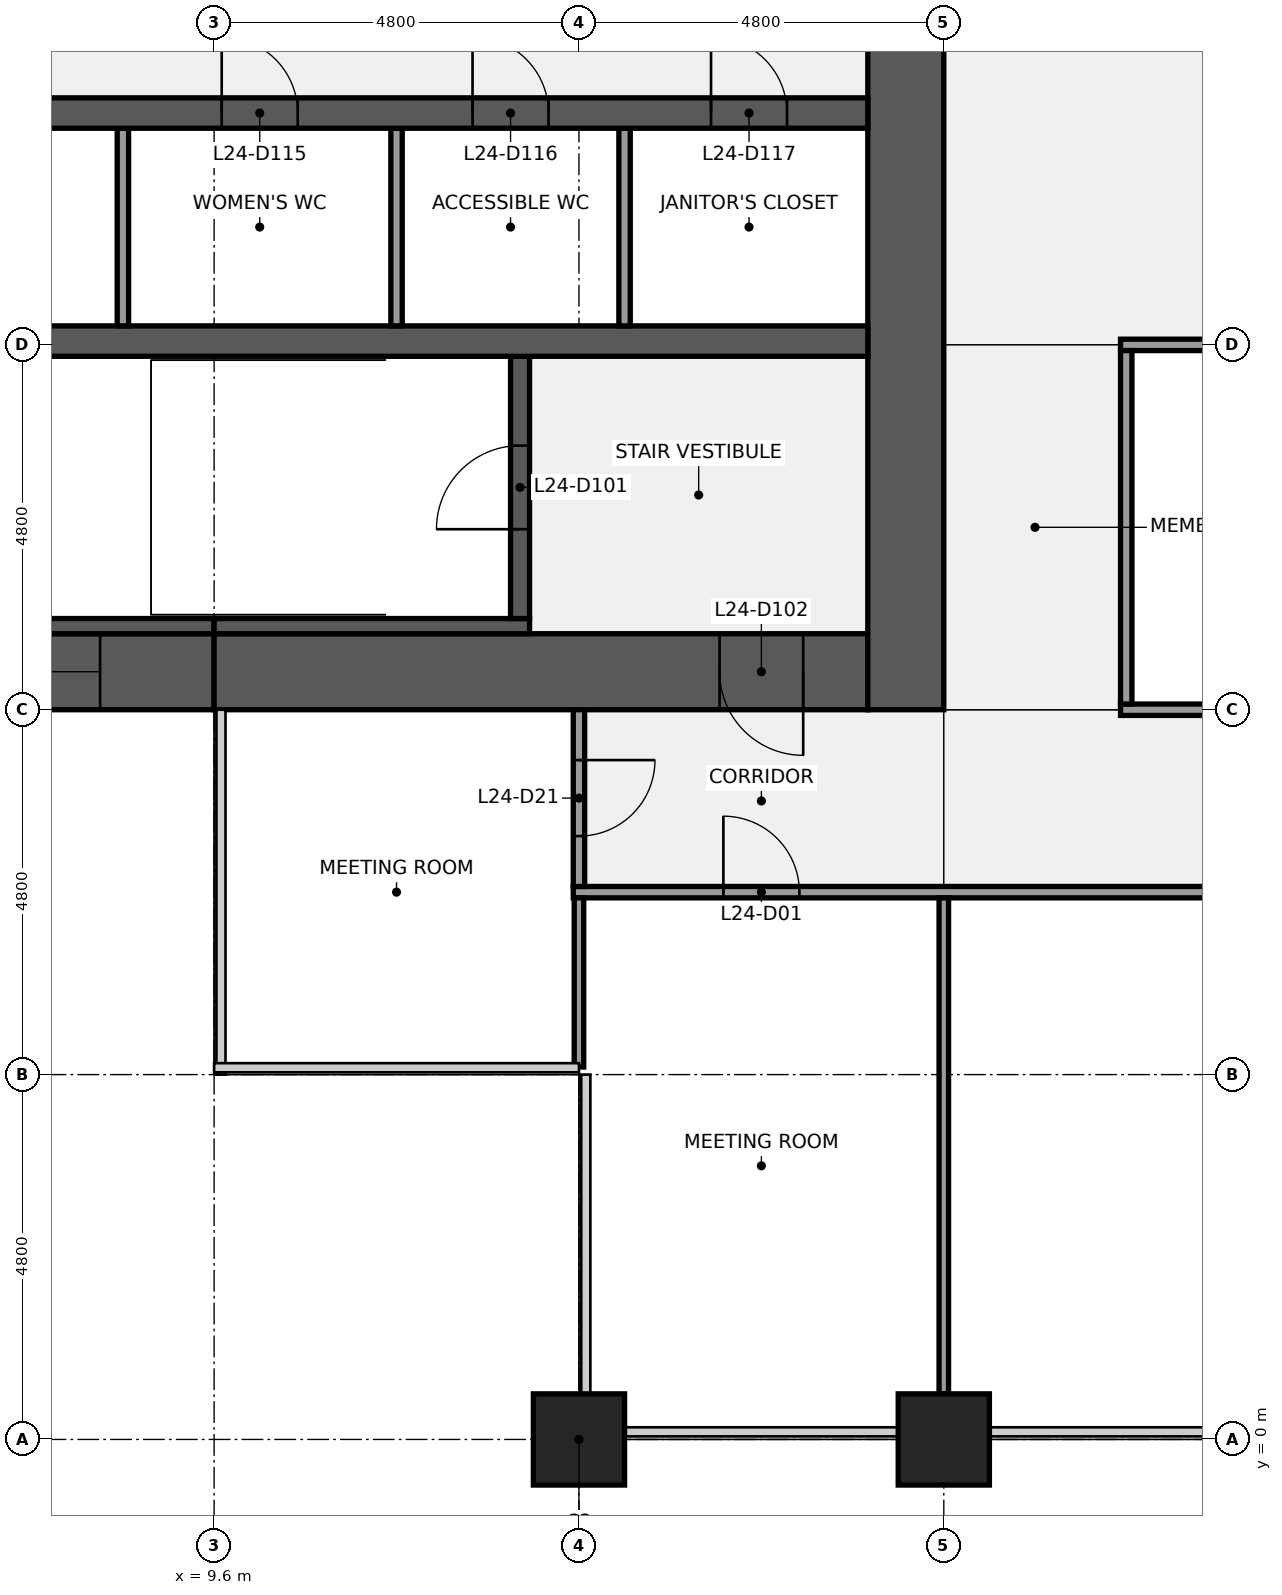
"""IFC4 building model, lengths in metres.
Left out: names, types, materials, properties, quantities, classifications, styles, units other than length and angle.
Written with IfcOpenShell. Run it as: python <this file> out.ifc"""

import sys

from ifc_helpers import new_model, si_unit, direction, frame, frame_2d, origin, origin_2d, place, context, subcontext, project, spatial, rectangle, extrude, element, fill, save


model = new_model("IFC4")
c1 = context("Model", 3, precision=1e-05, world=origin(), true_north=direction((0.0, 1.0)))
c2 = subcontext(c1, "Body", "Model", "MODEL_VIEW")
j1 = project(units=[si_unit("LENGTHUNIT", "METRE"), si_unit("PLANEANGLEUNIT", "RADIAN")], contexts=[c1])
p1 = place(None, origin())
s1 = spatial("IfcSite", under=j1, at=p1, CompositionType="ELEMENT")
p2 = place(p1, origin())
s2 = spatial("IfcBuilding", under=s1, at=p2, CompositionType="ELEMENT")
p3 = place(p2, frame((0.0, 0.0, 116.1)))
s3 = spatial("IfcBuildingStorey", under=s2, at=p3, CompositionType="ELEMENT", Elevation=116.1)
for number, where, z_axis, x_axis in (
    (1, (14.4, 0.0, 0.0), (0.0, 0.0, 1.0), (1.0, 0.0, 0.0)),
    (2, (19.2, 0.0, 0.0), (0.0, 0.0, 1.0), (1.0, 0.0, 0.0)),
):
    element("IfcColumn", number, at=place(p3, frame(where, z_axis=z_axis, x_axis=x_axis)), inside=s3, PredefinedType="COLUMN", context=c2, shape_type="SweptSolid", body=[
        extrude(rectangle(XDim=1.2, YDim=1.2, at=origin_2d()), origin(), (0.0, 0.0, 1.0), 4.0),
    ])
p4 = place(p3, frame((9.6, 10.1, 0.0), z_axis=(0.0, 0.0, 1.0), x_axis=(-1.0, 0.0, 0.0)))
e3 = element("IfcWall", 3, at=p4, inside=s3, PredefinedType="SHEAR", context=c2, shape_type="SweptSolid", body=[
    extrude(rectangle(XDim=8.6, YDim=1.0, at=frame_2d((4.3, 0.0))), origin(), (0.0, 0.0, 1.0), 3.84),
])
p5 = place(p4, frame((1.5, 0.0, 0.9)))
e4 = element("IfcOpeningElement", 4, at=p5, cuts=e3, PredefinedType="OPENING", context=c2, shape_type="SweptSolid", body=[
    extrude(rectangle(XDim=1.8, YDim=1.5, at=frame_2d((0.9, 0.75))), frame((0.0, 0.51, 0.0), z_axis=(0.0, -1.0, 0.0), x_axis=(1.0, 0.0, 0.0)), (0.0, 0.0, 1.0), 1.02),
])
p6 = place(p3, frame((18.2, 10.1, 0.0), z_axis=(0.0, 0.0, 1.0), x_axis=(-1.0, 0.0, 0.0)))
e5 = element("IfcWall", 5, at=p6, inside=s3, PredefinedType="SHEAR", context=c2, shape_type="SweptSolid", body=[
    extrude(rectangle(XDim=8.6, YDim=1.0, at=frame_2d((4.3, 0.0))), origin(), (0.0, 0.0, 1.0), 3.84),
])
p7 = place(p6, frame((0.85, 0.0, 0.0)))
e6 = element("IfcOpeningElement", 6, at=p7, cuts=e5, PredefinedType="OPENING", context=c2, shape_type="SweptSolid", body=[
    extrude(rectangle(XDim=1.1, YDim=2.1, at=frame_2d((0.55, 1.05))), frame((0.0, 0.51, 0.0), z_axis=(0.0, -1.0, 0.0), x_axis=(1.0, 0.0, 0.0)), (0.0, 0.0, 1.0), 1.02),
])
p8 = place(p3, frame((18.7, 38.4, 0.0), z_axis=(0.0, 0.0, 1.0), x_axis=(0.0, -1.0, 0.0)))
e7 = element("IfcWall", 7, at=p8, inside=s3, PredefinedType="SHEAR", context=c2, shape_type="SweptSolid", body=[
    extrude(rectangle(XDim=28.8, YDim=1.0, at=frame_2d((14.4, 0.0))), origin(), (0.0, 0.0, 1.0), 3.84),
])
p9 = place(p8, frame((18.3, 0.0, 0.0)))
e8 = element("IfcOpeningElement", 8, at=p9, cuts=e7, PredefinedType="OPENING", context=c2, shape_type="SweptSolid", body=[
    extrude(rectangle(XDim=1.8, YDim=2.1, at=frame_2d((0.9, 1.05))), frame((0.0, 0.51, 0.0), z_axis=(0.0, -1.0, 0.0), x_axis=(1.0, 0.0, 0.0)), (0.0, 0.0, 1.0), 1.02),
])
p10 = place(p8, frame((8.7, 0.0, 0.0)))
e9 = element("IfcOpeningElement", 9, at=p10, cuts=e7, PredefinedType="OPENING", context=c2, shape_type="SweptSolid", body=[
    extrude(rectangle(XDim=1.8, YDim=2.1, at=frame_2d((0.9, 1.05))), frame((0.0, 0.51, 0.0), z_axis=(0.0, -1.0, 0.0), x_axis=(1.0, 0.0, 0.0)), (0.0, 0.0, 1.0), 1.02),
])
p11 = place(p3, frame((6.25, 10.7, 0.0), z_axis=(0.0, 0.0, 1.0), x_axis=(1.0, 0.0, 0.0)))
e10 = element("IfcWall", 10, at=p11, inside=s3, PredefinedType="SHEAR", context=c2, shape_type="SweptSolid", body=[
    extrude(rectangle(XDim=3.35, YDim=0.2, at=frame_2d((1.675, 0.0))), origin(), (0.0, 0.0, 1.0), 3.84),
])
p12 = place(p3, frame((9.6, 10.7, 0.0), z_axis=(0.0, 0.0, 1.0), x_axis=(1.0, 0.0, 0.0)))
e11 = element("IfcWall", 11, at=p12, inside=s3, PredefinedType="SHEAR", context=c2, shape_type="SweptSolid", body=[
    extrude(rectangle(XDim=4.15, YDim=0.2, at=frame_2d((2.075, 0.0))), origin(), (0.0, 0.0, 1.0), 3.84),
])
p13 = place(p3, frame((13.625, 10.8, 0.0), z_axis=(0.0, 0.0, 1.0), x_axis=(0.0, 1.0, 0.0)))
e12 = element("IfcWall", 12, at=p13, inside=s3, PredefinedType="SHEAR", context=c2, shape_type="SweptSolid", body=[
    extrude(rectangle(XDim=3.45, YDim=0.25, at=frame_2d((1.725, 0.0))), origin(), (0.0, 0.0, 1.0), 3.84),
])
p14 = place(p13, frame((1.175, 0.0, 0.0)))
e13 = element("IfcOpeningElement", 13, at=p14, cuts=e12, PredefinedType="OPENING", context=c2, shape_type="SweptSolid", body=[
    extrude(rectangle(XDim=1.1, YDim=2.1, at=frame_2d((0.55, 1.05))), frame((0.0, 0.135, 0.0), z_axis=(0.0, -1.0, 0.0), x_axis=(1.0, 0.0, 0.0)), (0.0, 0.0, 1.0), 0.27),
])
p15 = place(p3, frame((1.0, 14.45, 0.0), z_axis=(0.0, 0.0, 1.0), x_axis=(1.0, 0.0, 0.0)))
e14 = element("IfcWall", 14, at=p15, inside=s3, PredefinedType="SHEAR", context=c2, shape_type="SweptSolid", body=[
    extrude(rectangle(XDim=17.2, YDim=0.4, at=frame_2d((8.6, 0.0))), origin(), (0.0, 0.0, 1.0), 3.84),
])
for number, where, z_axis, x_axis in (
    (15, (8.4, 14.65, 0.0), (0.0, 0.0, 1.0), (0.0, 1.0, 0.0)),
    (16, (12.0, 14.65, 0.0), (0.0, 0.0, 1.0), (0.0, 1.0, 0.0)),
    (17, (15.0, 14.65, 0.0), (0.0, 0.0, 1.0), (0.0, 1.0, 0.0)),
):
    element("IfcWall", number, at=place(p3, frame(where, z_axis=z_axis, x_axis=x_axis)), inside=s3, PredefinedType="PARTITIONING", context=c2, shape_type="SweptSolid", body=[
        extrude(rectangle(XDim=2.6, YDim=0.15, at=frame_2d((1.3, 0.0))), origin(), (0.0, 0.0, 1.0), 3.84),
    ])
p16 = place(p3, frame((1.0, 17.45, 0.0), z_axis=(0.0, 0.0, 1.0), x_axis=(1.0, 0.0, 0.0)))
e18 = element("IfcWall", 18, at=p16, inside=s3, PredefinedType="SHEAR", context=c2, shape_type="SweptSolid", body=[
    extrude(rectangle(XDim=17.2, YDim=0.4, at=frame_2d((8.6, 0.0))), origin(), (0.0, 0.0, 1.0), 3.84),
])
p17 = place(p16, frame((3.163, 0.0, 0.0)))
e19 = element("IfcOpeningElement", 19, at=p17, cuts=e18, PredefinedType="OPENING", context=c2, shape_type="SweptSolid", body=[
    extrude(rectangle(XDim=1.0, YDim=2.1, at=frame_2d((0.5, 1.05))), frame((0.0, 0.21, 0.0), z_axis=(0.0, -1.0, 0.0), x_axis=(1.0, 0.0, 0.0)), (0.0, 0.0, 1.0), 0.42),
])
p18 = place(p16, frame((8.7, 0.0, 0.0)))
e20 = element("IfcOpeningElement", 20, at=p18, cuts=e18, PredefinedType="OPENING", context=c2, shape_type="SweptSolid", body=[
    extrude(rectangle(XDim=1.0, YDim=2.1, at=frame_2d((0.5, 1.05))), frame((0.0, 0.21, 0.0), z_axis=(0.0, -1.0, 0.0), x_axis=(1.0, 0.0, 0.0)), (0.0, 0.0, 1.0), 0.42),
])
p19 = place(p16, frame((12.0, 0.0, 0.0)))
e21 = element("IfcOpeningElement", 21, at=p19, cuts=e18, PredefinedType="OPENING", context=c2, shape_type="SweptSolid", body=[
    extrude(rectangle(XDim=1.0, YDim=2.1, at=frame_2d((0.5, 1.05))), frame((0.0, 0.21, 0.0), z_axis=(0.0, -1.0, 0.0), x_axis=(1.0, 0.0, 0.0)), (0.0, 0.0, 1.0), 0.42),
])
p20 = place(p16, frame((15.137, 0.0, 0.0)))
e22 = element("IfcOpeningElement", 22, at=p20, cuts=e18, PredefinedType="OPENING", context=c2, shape_type="SweptSolid", body=[
    extrude(rectangle(XDim=1.0, YDim=2.1, at=frame_2d((0.5, 1.05))), frame((0.0, 0.21, 0.0), z_axis=(0.0, -1.0, 0.0), x_axis=(1.0, 0.0, 0.0)), (0.0, 0.0, 1.0), 0.42),
])
p21 = place(p3, frame((14.325, 7.2, 0.0), z_axis=(0.0, 0.0, 1.0), x_axis=(1.0, 0.0, 0.0)))
e23 = element("IfcWall", 23, at=p21, inside=s3, PredefinedType="PARTITIONING", context=c2, shape_type="SweptSolid", body=[
    extrude(rectangle(XDim=28.95, YDim=0.15, at=frame_2d((14.475, 0.0))), origin(), (0.0, 0.0, 1.0), 2.936),
])
p22 = place(p21, frame((1.975, 0.0, 0.0)))
e24 = element("IfcOpeningElement", 24, at=p22, cuts=e23, PredefinedType="OPENING", context=c2, shape_type="SweptSolid", body=[
    extrude(rectangle(XDim=1.0, YDim=2.1, at=frame_2d((0.5, 1.05))), frame((0.0, 0.085, 0.0), z_axis=(0.0, -1.0, 0.0), x_axis=(1.0, 0.0, 0.0)), (0.0, 0.0, 1.0), 0.17),
])
p23 = place(p21, frame((9.175, 0.0, 0.0)))
e25 = element("IfcOpeningElement", 25, at=p23, cuts=e23, PredefinedType="OPENING", context=c2, shape_type="SweptSolid", body=[
    extrude(rectangle(XDim=1.0, YDim=2.1, at=frame_2d((0.5, 1.05))), frame((0.0, 0.085, 0.0), z_axis=(0.0, -1.0, 0.0), x_axis=(1.0, 0.0, 0.0)), (0.0, 0.0, 1.0), 0.17),
])
p24 = place(p21, frame((15.175, 0.0, 0.0)))
e26 = element("IfcOpeningElement", 26, at=p24, cuts=e23, PredefinedType="OPENING", context=c2, shape_type="SweptSolid", body=[
    extrude(rectangle(XDim=1.0, YDim=2.1, at=frame_2d((0.5, 1.05))), frame((0.0, 0.085, 0.0), z_axis=(0.0, -1.0, 0.0), x_axis=(1.0, 0.0, 0.0)), (0.0, 0.0, 1.0), 0.17),
])
p25 = place(p21, frame((18.775, 0.0, 0.0)))
e27 = element("IfcOpeningElement", 27, at=p25, cuts=e23, PredefinedType="OPENING", context=c2, shape_type="SweptSolid", body=[
    extrude(rectangle(XDim=1.0, YDim=2.1, at=frame_2d((0.5, 1.05))), frame((0.0, 0.085, 0.0), z_axis=(0.0, -1.0, 0.0), x_axis=(1.0, 0.0, 0.0)), (0.0, 0.0, 1.0), 0.17),
])
p26 = place(p21, frame((22.375, 0.0, 0.0)))
e28 = element("IfcOpeningElement", 28, at=p26, cuts=e23, PredefinedType="OPENING", context=c2, shape_type="SweptSolid", body=[
    extrude(rectangle(XDim=1.0, YDim=2.1, at=frame_2d((0.5, 1.05))), frame((0.0, 0.085, 0.0), z_axis=(0.0, -1.0, 0.0), x_axis=(1.0, 0.0, 0.0)), (0.0, 0.0, 1.0), 0.17),
])
p27 = place(p21, frame((25.975, 0.0, 0.0)))
e29 = element("IfcOpeningElement", 29, at=p27, cuts=e23, PredefinedType="OPENING", context=c2, shape_type="SweptSolid", body=[
    extrude(rectangle(XDim=1.0, YDim=2.1, at=frame_2d((0.5, 1.05))), frame((0.0, 0.085, 0.0), z_axis=(0.0, -1.0, 0.0), x_axis=(1.0, 0.0, 0.0)), (0.0, 0.0, 1.0), 0.17),
])
p28 = place(p3, frame((21.525, 9.6, 0.0), z_axis=(0.0, 0.0, 1.0), x_axis=(1.0, 0.0, 0.0)))
e30 = element("IfcWall", 30, at=p28, inside=s3, PredefinedType="PARTITIONING", context=c2, shape_type="SweptSolid", body=[
    extrude(rectangle(XDim=14.55, YDim=0.15, at=frame_2d((7.275, 0.0))), origin(), (0.0, 0.0, 1.0), 2.936),
])
p29 = place(p28, frame((3.175, 0.0, 0.0)))
e31 = element("IfcOpeningElement", 31, at=p29, cuts=e30, PredefinedType="OPENING", context=c2, shape_type="SweptSolid", body=[
    extrude(rectangle(XDim=1.0, YDim=2.1, at=frame_2d((0.5, 1.05))), frame((0.0, 0.085, 0.0), z_axis=(0.0, -1.0, 0.0), x_axis=(1.0, 0.0, 0.0)), (0.0, 0.0, 1.0), 0.17),
])
p30 = place(p28, frame((10.375, 0.0, 0.0)))
e32 = element("IfcOpeningElement", 32, at=p30, cuts=e30, PredefinedType="OPENING", context=c2, shape_type="SweptSolid", body=[
    extrude(rectangle(XDim=1.0, YDim=2.1, at=frame_2d((0.5, 1.05))), frame((0.0, 0.085, 0.0), z_axis=(0.0, -1.0, 0.0), x_axis=(1.0, 0.0, 0.0)), (0.0, 0.0, 1.0), 0.17),
])
p31 = place(p3, frame((21.525, 14.4, 0.0), z_axis=(0.0, 0.0, 1.0), x_axis=(1.0, 0.0, 0.0)))
e33 = element("IfcWall", 33, at=p31, inside=s3, PredefinedType="PARTITIONING", context=c2, shape_type="SweptSolid", body=[
    extrude(rectangle(XDim=2.55, YDim=0.15, at=frame_2d((1.275, 0.0))), origin(), (0.0, 0.0, 1.0), 2.936),
])
p32 = place(p3, frame((14.4, 4.9, 0.0), z_axis=(0.0, 0.0, 1.0), x_axis=(0.0, 1.0, 0.0)))
e34 = element("IfcWall", 34, at=p32, inside=s3, PredefinedType="PARTITIONING", context=c2, shape_type="SweptSolid", body=[
    extrude(rectangle(XDim=2.225, YDim=0.125, at=frame_2d((1.113, 0.0))), origin(), (0.0, 0.0, 1.0), 2.936),
])
p33 = place(p3, frame((14.4, 7.275, 0.0), z_axis=(0.0, 0.0, 1.0), x_axis=(0.0, 1.0, 0.0)))
e35 = element("IfcWall", 35, at=p33, inside=s3, PredefinedType="PARTITIONING", context=c2, shape_type="SweptSolid", body=[
    extrude(rectangle(XDim=2.325, YDim=0.15, at=frame_2d((1.163, 0.0))), origin(), (0.0, 0.0, 1.0), 2.936),
])
p34 = place(p33, frame((0.663, 0.0, 0.0)))
e36 = element("IfcOpeningElement", 36, at=p34, cuts=e35, PredefinedType="OPENING", context=c2, shape_type="SweptSolid", body=[
    extrude(rectangle(XDim=1.0, YDim=2.1, at=frame_2d((0.5, 1.05))), frame((0.0, 0.085, 0.0), z_axis=(0.0, -1.0, 0.0), x_axis=(1.0, 0.0, 0.0)), (0.0, 0.0, 1.0), 0.17),
])
p35 = place(p3, frame((19.2, 0.6, 0.0), z_axis=(0.0, 0.0, 1.0), x_axis=(0.0, 1.0, 0.0)))
e37 = element("IfcWall", 37, at=p35, inside=s3, PredefinedType="PARTITIONING", context=c2, shape_type="SweptSolid", body=[
    extrude(rectangle(XDim=6.525, YDim=0.125, at=frame_2d((3.262, 0.0))), origin(), (0.0, 0.0, 1.0), 2.936),
])
p36 = place(p3, frame((21.6, 9.675, 0.0), z_axis=(0.0, 0.0, 1.0), x_axis=(0.0, 1.0, 0.0)))
e38 = element("IfcWall", 38, at=p36, inside=s3, PredefinedType="PARTITIONING", context=c2, shape_type="SweptSolid", body=[
    extrude(rectangle(XDim=4.65, YDim=0.15, at=frame_2d((2.325, 0.0))), origin(), (0.0, 0.0, 1.0), 2.936),
])
for number, where, z_axis, x_axis in (
    (39, (14.4, -1.05, 0.0), (0.0, 0.0, 1.0), (1.0, 0.0, 0.0)),
    (40, (19.2, -1.05, 0.0), (0.0, 0.0, 1.0), (1.0, 0.0, 0.0)),
):
    element("IfcColumn", number, at=place(p3, frame(where, z_axis=z_axis, x_axis=x_axis)), inside=s3, PredefinedType="PILASTER", context=c2, shape_type="SweptSolid", body=[
        extrude(rectangle(XDim=3.6, YDim=0.9, at=origin_2d()), origin(), (0.0, 0.0, 1.0), 4.0),
    ])
p37 = place(p14, origin())
e41 = element("IfcDoor", 41, at=p37, inside=s3, OperationType="SINGLE_SWING_LEFT", PredefinedType="DOOR", context=c2, shape_type="SweptSolid", body=[
    extrude(rectangle(XDim=1.1, YDim=2.1, at=frame_2d((0.55, 1.05))), frame((0.0, 0.025, 0.0), z_axis=(0.0, -1.0, 0.0), x_axis=(1.0, 0.0, 0.0)), (0.0, 0.0, 1.0), 0.05),
])
fill(e13, e41)
p38 = place(p7, origin())
e42 = element("IfcDoor", 42, at=p38, inside=s3, OperationType="SINGLE_SWING_LEFT", PredefinedType="DOOR", context=c2, shape_type="SweptSolid", body=[
    extrude(rectangle(XDim=1.1, YDim=2.1, at=frame_2d((0.55, 1.05))), frame((0.0, 0.025, 0.0), z_axis=(0.0, -1.0, 0.0), x_axis=(1.0, 0.0, 0.0)), (0.0, 0.0, 1.0), 0.05),
])
fill(e6, e42)
p39 = place(p18, origin())
e43 = element("IfcDoor", 43, at=p39, inside=s3, OperationType="SINGLE_SWING_LEFT", PredefinedType="DOOR", context=c2, shape_type="SweptSolid", body=[
    extrude(rectangle(XDim=1.0, YDim=2.1, at=frame_2d((0.5, 1.05))), frame((0.0, 0.025, 0.0), z_axis=(0.0, -1.0, 0.0), x_axis=(1.0, 0.0, 0.0)), (0.0, 0.0, 1.0), 0.05),
])
fill(e20, e43)
p40 = place(p19, origin())
e44 = element("IfcDoor", 44, at=p40, inside=s3, OperationType="SINGLE_SWING_LEFT", PredefinedType="DOOR", context=c2, shape_type="SweptSolid", body=[
    extrude(rectangle(XDim=1.0, YDim=2.1, at=frame_2d((0.5, 1.05))), frame((0.0, 0.025, 0.0), z_axis=(0.0, -1.0, 0.0), x_axis=(1.0, 0.0, 0.0)), (0.0, 0.0, 1.0), 0.05),
])
fill(e21, e44)
p41 = place(p20, origin())
e45 = element("IfcDoor", 45, at=p41, inside=s3, OperationType="SINGLE_SWING_LEFT", PredefinedType="DOOR", context=c2, shape_type="SweptSolid", body=[
    extrude(rectangle(XDim=1.0, YDim=2.1, at=frame_2d((0.5, 1.05))), frame((0.0, 0.025, 0.0), z_axis=(0.0, -1.0, 0.0), x_axis=(1.0, 0.0, 0.0)), (0.0, 0.0, 1.0), 0.05),
])
fill(e22, e45)
p42 = place(p5, origin())
e46 = element("IfcWindow", 46, at=p42, inside=s3, PartitioningType="SINGLE_PANEL", PredefinedType="WINDOW", context=c2, shape_type="SweptSolid", body=[
    extrude(rectangle(XDim=1.8, YDim=1.5, at=frame_2d((0.9, 0.75))), frame((0.0, 0.03, 0.0), z_axis=(0.0, -1.0, 0.0), x_axis=(1.0, 0.0, 0.0)), (0.0, 0.0, 1.0), 0.06),
])
fill(e4, e46)
p43 = place(p22, origin())
e47 = element("IfcDoor", 47, at=p43, inside=s3, OperationType="SINGLE_SWING_LEFT", PredefinedType="DOOR", context=c2, shape_type="SweptSolid", body=[
    extrude(rectangle(XDim=1.0, YDim=2.1, at=frame_2d((0.5, 1.05))), frame((0.0, 0.025, 0.0), z_axis=(0.0, -1.0, 0.0), x_axis=(1.0, 0.0, 0.0)), (0.0, 0.0, 1.0), 0.05),
])
fill(e24, e47)
p44 = place(p34, origin())
e48 = element("IfcDoor", 48, at=p44, inside=s3, OperationType="SINGLE_SWING_RIGHT", PredefinedType="DOOR", context=c2, shape_type="SweptSolid", body=[
    extrude(rectangle(XDim=1.0, YDim=2.1, at=frame_2d((0.5, 1.05))), frame((0.0, 0.025, 0.0), z_axis=(0.0, -1.0, 0.0), x_axis=(1.0, 0.0, 0.0)), (0.0, 0.0, 1.0), 0.05),
])
fill(e36, e48)
save(model, sys.argv[1])
